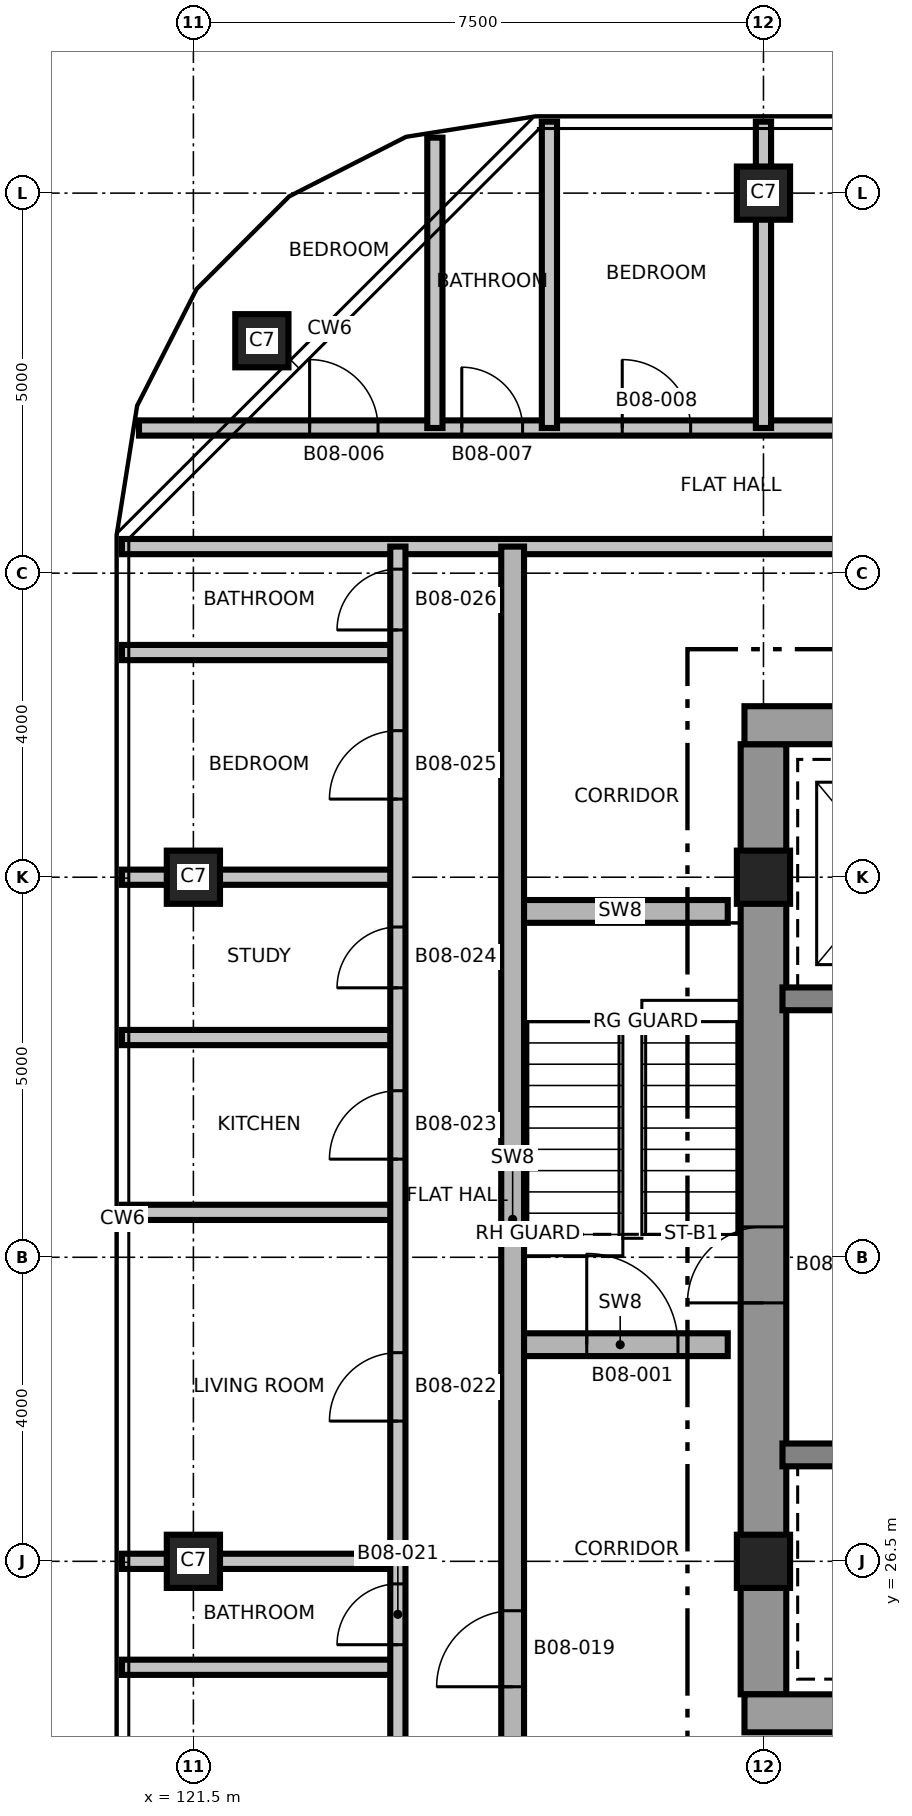
"""IFC4 building model, lengths in metres.
Left out: names, types, materials, properties, quantities, classifications, styles, units other than length and angle.
Written with IfcOpenShell. Run it as: python <this file> out.ifc"""

import sys

from ifc_helpers import new_model, si_unit, direction, frame, frame_2d, origin, origin_2d, place, context, subcontext, project, spatial, rectangle, extrude, element, fill, save


model = new_model("IFC4")
c1 = context("Model", 3, precision=1e-05, world=origin(), true_north=direction((0.0, 1.0)))
c2 = subcontext(c1, "Body", "Model", "MODEL_VIEW")
j1 = project(units=[si_unit("LENGTHUNIT", "METRE"), si_unit("PLANEANGLEUNIT", "RADIAN")], contexts=[c1])
p1 = place(None, origin())
s1 = spatial("IfcSite", under=j1, at=p1, CompositionType="ELEMENT")
p2 = place(p1, origin())
s2 = spatial("IfcBuilding", under=s1, at=p2, CompositionType="ELEMENT")
p3 = place(p2, frame((0.0, 0.0, 94.5)))
s3 = spatial("IfcBuildingStorey", under=s2, at=p3, CompositionType="ELEMENT", Elevation=94.5)
p4 = place(p3, frame((129.0, 24.75, 0.0), z_axis=(0.0, 0.0, 1.0), x_axis=(0.0, 1.0, 0.0)))
e1 = element("IfcWall", 1, at=p4, inside=s3, PredefinedType="SHEAR", context=c2, shape_type="SweptSolid", body=[
    extrude(rectangle(XDim=12.5, YDim=0.6, at=frame_2d((6.25, 0.0))), origin(), (0.0, 0.0, 1.0), 3.7),
])
p5 = place(p4, frame((5.15, 0.0, 0.0)))
e2 = element("IfcOpeningElement", 2, at=p5, cuts=e1, PredefinedType="OPENING", context=c2, shape_type="SweptSolid", body=[
    extrude(rectangle(XDim=1.0, YDim=2.1, at=frame_2d((0.5, 1.05))), frame((0.0, 0.31, 0.0), z_axis=(0.0, -1.0, 0.0), x_axis=(1.0, 0.0, 0.0)), (0.0, 0.0, 1.0), 0.62),
])
p6 = place(p3, frame((128.75, 24.5, 0.0), z_axis=(0.0, 0.0, 1.0), x_axis=(1.0, 0.0, 0.0)))
e3 = element("IfcWall", 3, at=p6, inside=s3, PredefinedType="SHEAR", context=c2, shape_type="SweptSolid", body=[
    extrude(rectangle(XDim=15.0, YDim=0.5, at=frame_2d((7.5, 0.0))), origin(), (0.0, 0.0, 1.0), 3.7),
])
p7 = place(p6, frame((9.65, 0.0, 0.0)))
e4 = element("IfcOpeningElement", 4, at=p7, cuts=e3, PredefinedType="OPENING", context=c2, shape_type="SweptSolid", body=[
    extrude(rectangle(XDim=1.5, YDim=2.1, at=frame_2d((0.75, 1.05))), frame((0.0, 0.26, 0.0), z_axis=(0.0, -1.0, 0.0), x_axis=(1.0, 0.0, 0.0)), (0.0, 0.0, 1.0), 0.52),
])
p8 = place(p6, frame((1.25, 0.0, 0.0)))
e5 = element("IfcOpeningElement", 5, at=p8, cuts=e3, PredefinedType="OPENING", context=c2, shape_type="SweptSolid", body=[
    extrude(rectangle(XDim=0.9, YDim=2.1, at=frame_2d((0.45, 1.05))), frame((0.0, 0.26, 0.0), z_axis=(0.0, -1.0, 0.0), x_axis=(1.0, 0.0, 0.0)), (0.0, 0.0, 1.0), 0.52),
])
p9 = place(p3, frame((128.75, 37.5, 0.0), z_axis=(0.0, 0.0, 1.0), x_axis=(1.0, 0.0, 0.0)))
e6 = element("IfcWall", 6, at=p9, inside=s3, PredefinedType="SHEAR", context=c2, shape_type="SweptSolid", body=[
    extrude(rectangle(XDim=15.0, YDim=0.5, at=frame_2d((7.5, 0.0))), origin(), (0.0, 0.0, 1.0), 3.7),
])
p10 = place(p9, frame((9.65, 0.0, 0.0)))
e7 = element("IfcOpeningElement", 7, at=p10, cuts=e6, PredefinedType="OPENING", context=c2, shape_type="SweptSolid", body=[
    extrude(rectangle(XDim=1.5, YDim=2.1, at=frame_2d((0.75, 1.05))), frame((0.0, 0.26, 0.0), z_axis=(0.0, -1.0, 0.0), x_axis=(1.0, 0.0, 0.0)), (0.0, 0.0, 1.0), 0.52),
])
p11 = place(p9, frame((12.85, 0.0, 0.0)))
e8 = element("IfcOpeningElement", 8, at=p11, cuts=e6, PredefinedType="OPENING", context=c2, shape_type="SweptSolid", body=[
    extrude(rectangle(XDim=0.9, YDim=2.1, at=frame_2d((0.45, 1.05))), frame((0.0, 0.26, 0.0), z_axis=(0.0, -1.0, 0.0), x_axis=(1.0, 0.0, 0.0)), (0.0, 0.0, 1.0), 0.52),
])
p12 = place(p9, frame((3.65, 0.0, 0.0)))
e9 = element("IfcOpeningElement", 9, at=p12, cuts=e6, PredefinedType="OPENING", context=c2, shape_type="SweptSolid", body=[
    extrude(rectangle(XDim=0.9, YDim=2.1, at=frame_2d((0.45, 1.05))), frame((0.0, 0.26, 0.0), z_axis=(0.0, -1.0, 0.0), x_axis=(1.0, 0.0, 0.0)), (0.0, 0.0, 1.0), 0.52),
])
p13 = place(p9, frame((5.55, 0.0, 0.0)))
e10 = element("IfcOpeningElement", 10, at=p13, cuts=e6, PredefinedType="OPENING", context=c2, shape_type="SweptSolid", body=[
    extrude(rectangle(XDim=0.9, YDim=2.1, at=frame_2d((0.45, 1.05))), frame((0.0, 0.26, 0.0), z_axis=(0.0, -1.0, 0.0), x_axis=(1.0, 0.0, 0.0)), (0.0, 0.0, 1.0), 0.52),
])
p14 = place(p9, frame((7.45, 0.0, 0.0)))
e11 = element("IfcOpeningElement", 11, at=p14, cuts=e6, PredefinedType="OPENING", context=c2, shape_type="SweptSolid", body=[
    extrude(rectangle(XDim=0.9, YDim=2.1, at=frame_2d((0.45, 1.05))), frame((0.0, 0.26, 0.0), z_axis=(0.0, -1.0, 0.0), x_axis=(1.0, 0.0, 0.0)), (0.0, 0.0, 1.0), 0.52),
])
p15 = place(p3, frame((129.25, 27.9, 0.0), z_axis=(0.0, 0.0, 1.0), x_axis=(1.0, 0.0, 0.0)))
e12 = element("IfcWall", 12, at=p15, inside=s3, PredefinedType="SHEAR", context=c2, shape_type="SweptSolid", body=[
    extrude(rectangle(XDim=2.7, YDim=0.3, at=frame_2d((1.35, 0.0))), origin(), (0.0, 0.0, 1.0), 3.7),
])
p16 = place(p3, frame((129.25, 33.9, 0.0), z_axis=(0.0, 0.0, 1.0), x_axis=(1.0, 0.0, 0.0)))
e13 = element("IfcWall", 13, at=p16, inside=s3, PredefinedType="SHEAR", context=c2, shape_type="SweptSolid", body=[
    extrude(rectangle(XDim=2.7, YDim=0.3, at=frame_2d((1.35, 0.0))), origin(), (0.0, 0.0, 1.0), 3.7),
])
p17 = place(p16, frame((1.05, 0.0, 0.0)))
e14 = element("IfcOpeningElement", 14, at=p17, cuts=e13, PredefinedType="OPENING", context=c2, shape_type="SweptSolid", body=[
    extrude(rectangle(XDim=1.3, YDim=2.4, at=frame_2d((0.65, 1.2))), frame((0.0, 0.16, 0.0), z_axis=(0.0, -1.0, 0.0), x_axis=(1.0, 0.0, 0.0)), (0.0, 0.0, 1.0), 0.32),
])
for number, where, z_axis, x_axis in (
    (15, (121.5, 26.5, 0.0), (0.0, 0.0, 1.0), (1.0, 0.0, 0.0)),
    (16, (129.0, 26.5, 0.0), (0.0, 0.0, 1.0), (1.0, 0.0, 0.0)),
    (17, (121.5, 35.5, 0.0), (0.0, 0.0, 1.0), (1.0, 0.0, 0.0)),
    (18, (129.0, 35.5, 0.0), (0.0, 0.0, 1.0), (1.0, 0.0, 0.0)),
    (19, (122.401, 42.558, 0.0), (0.0, 0.0, 1.0), (1.0, 0.0, 0.0)),
    (20, (129.0, 44.5, 0.0), (0.0, 0.0, 1.0), (1.0, 0.0, 0.0)),
):
    element("IfcColumn", number, at=place(p3, frame(where, z_axis=z_axis, x_axis=x_axis)), inside=s3, PredefinedType="COLUMN", context=c2, shape_type="SweptSolid", body=[
        extrude(rectangle(XDim=0.7, YDim=0.7, at=origin_2d()), origin(), (0.0, 0.0, 1.0), 3.7),
    ])
for number, where, z_axis, x_axis in (
    (21, (120.56, 25.106, 0.0), (0.0, 0.0, 1.0), (1.0, 0.0, 0.0)),
    (22, (120.56, 26.5, 0.0), (0.0, 0.0, 1.0), (1.0, 0.0, 0.0)),
):
    element("IfcWall", number, at=place(p3, frame(where, z_axis=z_axis, x_axis=x_axis)), inside=s3, PredefinedType="PARTITIONING", context=c2, shape_type="SweptSolid", body=[
        extrude(rectangle(XDim=3.63, YDim=0.2, at=frame_2d((1.815, 0.0))), origin(), (0.0, 0.0, 1.0), 3.4),
    ])
p18 = place(p3, frame((125.7, 29.35, 0.0), z_axis=(0.0, 0.0, 1.0), x_axis=(1.0, 0.0, 0.0)))
e23 = element("IfcWall", 23, at=p18, inside=s3, PredefinedType="SHEAR", context=c2, shape_type="SweptSolid", body=[
    extrude(rectangle(XDim=2.83, YDim=0.3, at=frame_2d((1.415, 0.0))), origin(), (0.0, 0.0, 1.0), 3.4),
])
p19 = place(p18, frame((0.975, 0.0, 0.0)))
e24 = element("IfcOpeningElement", 24, at=p19, cuts=e23, PredefinedType="OPENING", context=c2, shape_type="SweptSolid", body=[
    extrude(rectangle(XDim=1.2, YDim=2.1, at=frame_2d((0.6, 1.05))), frame((0.0, 0.16, 0.0), z_axis=(0.0, -1.0, 0.0), x_axis=(1.0, 0.0, 0.0)), (0.0, 0.0, 1.0), 0.32),
])
for number, where, z_axis, x_axis in (
    (25, (120.56, 31.091, 0.0), (0.0, 0.0, 1.0), (1.0, 0.0, 0.0)),
    (26, (120.56, 33.391, 0.0), (0.0, 0.0, 1.0), (1.0, 0.0, 0.0)),
):
    element("IfcWall", number, at=place(p3, frame(where, z_axis=z_axis, x_axis=x_axis)), inside=s3, PredefinedType="PARTITIONING", context=c2, shape_type="SweptSolid", body=[
        extrude(rectangle(XDim=3.63, YDim=0.2, at=frame_2d((1.815, 0.0))), origin(), (0.0, 0.0, 1.0), 3.4),
    ])
p20 = place(p3, frame((125.7, 35.05, 0.0), z_axis=(0.0, 0.0, 1.0), x_axis=(1.0, 0.0, 0.0)))
e27 = element("IfcWall", 27, at=p20, inside=s3, PredefinedType="SHEAR", context=c2, shape_type="SweptSolid", body=[
    extrude(rectangle(XDim=2.83, YDim=0.3, at=frame_2d((1.415, 0.0))), origin(), (0.0, 0.0, 1.0), 3.4),
])
for number, where, z_axis, x_axis in (
    (28, (120.56, 35.5, 0.0), (0.0, 0.0, 1.0), (1.0, 0.0, 0.0)),
    (29, (120.56, 38.456, 0.0), (0.0, 0.0, 1.0), (1.0, 0.0, 0.0)),
):
    element("IfcWall", number, at=place(p3, frame(where, z_axis=z_axis, x_axis=x_axis)), inside=s3, PredefinedType="PARTITIONING", context=c2, shape_type="SweptSolid", body=[
        extrude(rectangle(XDim=3.63, YDim=0.2, at=frame_2d((1.815, 0.0))), origin(), (0.0, 0.0, 1.0), 3.4),
    ])
p21 = place(p3, frame((120.56, 39.85, 0.0), z_axis=(0.0, 0.0, 1.0), x_axis=(1.0, 0.0, 0.0)))
e30 = element("IfcWall", 30, at=p21, inside=s3, PredefinedType="PARTITIONING", context=c2, shape_type="SweptSolid", body=[
    extrude(rectangle(XDim=24.38, YDim=0.2, at=frame_2d((12.19, 0.0))), origin(), (0.0, 0.0, 1.0), 3.4),
])
p22 = place(p21, frame((10.54, 0.0, 0.0)))
e31 = element("IfcOpeningElement", 31, at=p22, cuts=e30, PredefinedType="OPENING", context=c2, shape_type="SweptSolid", body=[
    extrude(rectangle(XDim=1.0, YDim=2.1, at=frame_2d((0.5, 1.05))), frame((0.0, 0.11, 0.0), z_axis=(0.0, -1.0, 0.0), x_axis=(1.0, 0.0, 0.0)), (0.0, 0.0, 1.0), 0.22),
])
p23 = place(p21, frame((16.09, 0.0, 0.0)))
e32 = element("IfcOpeningElement", 32, at=p23, cuts=e30, PredefinedType="OPENING", context=c2, shape_type="SweptSolid", body=[
    extrude(rectangle(XDim=1.8, YDim=2.1, at=frame_2d((0.9, 1.05))), frame((0.0, 0.11, 0.0), z_axis=(0.0, -1.0, 0.0), x_axis=(1.0, 0.0, 0.0)), (0.0, 0.0, 1.0), 0.22),
])
p24 = place(p3, frame((120.784, 41.41, 0.0), z_axis=(0.0, 0.0, 1.0), x_axis=(1.0, 0.0, 0.0)))
e33 = element("IfcWall", 33, at=p24, inside=s3, PredefinedType="PARTITIONING", context=c2, shape_type="SweptSolid", body=[
    extrude(rectangle(XDim=15.716, YDim=0.2, at=frame_2d((7.858, 0.0))), origin(), (0.0, 0.0, 1.0), 3.4),
])
p25 = place(p24, frame((2.245, 0.0, 0.0)))
e34 = element("IfcOpeningElement", 34, at=p25, cuts=e33, PredefinedType="OPENING", context=c2, shape_type="SweptSolid", body=[
    extrude(rectangle(XDim=0.9, YDim=2.1, at=frame_2d((0.45, 1.05))), frame((0.0, 0.11, 0.0), z_axis=(0.0, -1.0, 0.0), x_axis=(1.0, 0.0, 0.0)), (0.0, 0.0, 1.0), 0.22),
])
p26 = place(p24, frame((4.247, 0.0, 0.0)))
e35 = element("IfcOpeningElement", 35, at=p26, cuts=e33, PredefinedType="OPENING", context=c2, shape_type="SweptSolid", body=[
    extrude(rectangle(XDim=0.8, YDim=2.1, at=frame_2d((0.4, 1.05))), frame((0.0, 0.11, 0.0), z_axis=(0.0, -1.0, 0.0), x_axis=(1.0, 0.0, 0.0)), (0.0, 0.0, 1.0), 0.22),
])
p27 = place(p24, frame((6.358, 0.0, 0.0)))
e36 = element("IfcOpeningElement", 36, at=p27, cuts=e33, PredefinedType="OPENING", context=c2, shape_type="SweptSolid", body=[
    extrude(rectangle(XDim=0.9, YDim=2.1, at=frame_2d((0.45, 1.05))), frame((0.0, 0.11, 0.0), z_axis=(0.0, -1.0, 0.0), x_axis=(1.0, 0.0, 0.0)), (0.0, 0.0, 1.0), 0.22),
])
p28 = place(p24, frame((10.233, 0.0, 0.0)))
e37 = element("IfcOpeningElement", 37, at=p28, cuts=e33, PredefinedType="OPENING", context=c2, shape_type="SweptSolid", body=[
    extrude(rectangle(XDim=0.9, YDim=2.1, at=frame_2d((0.45, 1.05))), frame((0.0, 0.11, 0.0), z_axis=(0.0, -1.0, 0.0), x_axis=(1.0, 0.0, 0.0)), (0.0, 0.0, 1.0), 0.22),
])
p29 = place(p24, frame((13.983, 0.0, 0.0)))
e38 = element("IfcOpeningElement", 38, at=p29, cuts=e33, PredefinedType="OPENING", context=c2, shape_type="SweptSolid", body=[
    extrude(rectangle(XDim=0.9, YDim=2.1, at=frame_2d((0.45, 1.05))), frame((0.0, 0.11, 0.0), z_axis=(0.0, -1.0, 0.0), x_axis=(1.0, 0.0, 0.0)), (0.0, 0.0, 1.0), 0.22),
])
p30 = place(p3, frame((124.19, 22.15, 0.0), z_axis=(0.0, 0.0, 1.0), x_axis=(0.0, 1.0, 0.0)))
e39 = element("IfcWall", 39, at=p30, inside=s3, PredefinedType="PARTITIONING", context=c2, shape_type="SweptSolid", body=[
    extrude(rectangle(XDim=17.7, YDim=0.2, at=frame_2d((8.85, 0.0))), origin(), (0.0, 0.0, 1.0), 3.4),
])
p31 = place(p30, frame((1.028, 0.0, 0.0)))
e40 = element("IfcOpeningElement", 40, at=p31, cuts=e39, PredefinedType="OPENING", context=c2, shape_type="SweptSolid", body=[
    extrude(rectangle(XDim=0.9, YDim=2.1, at=frame_2d((0.45, 1.05))), frame((0.0, 0.11, 0.0), z_axis=(0.0, -1.0, 0.0), x_axis=(1.0, 0.0, 0.0)), (0.0, 0.0, 1.0), 0.22),
])
p32 = place(p30, frame((3.253, 0.0, 0.0)))
e41 = element("IfcOpeningElement", 41, at=p32, cuts=e39, PredefinedType="OPENING", context=c2, shape_type="SweptSolid", body=[
    extrude(rectangle(XDim=0.8, YDim=2.1, at=frame_2d((0.4, 1.05))), frame((0.0, 0.11, 0.0), z_axis=(0.0, -1.0, 0.0), x_axis=(1.0, 0.0, 0.0)), (0.0, 0.0, 1.0), 0.22),
])
p33 = place(p30, frame((6.195, 0.0, 0.0)))
e42 = element("IfcOpeningElement", 42, at=p33, cuts=e39, PredefinedType="OPENING", context=c2, shape_type="SweptSolid", body=[
    extrude(rectangle(XDim=0.9, YDim=2.1, at=frame_2d((0.45, 1.05))), frame((0.0, 0.11, 0.0), z_axis=(0.0, -1.0, 0.0), x_axis=(1.0, 0.0, 0.0)), (0.0, 0.0, 1.0), 0.22),
])
p34 = place(p30, frame((9.641, 0.0, 0.0)))
e43 = element("IfcOpeningElement", 43, at=p34, cuts=e39, PredefinedType="OPENING", context=c2, shape_type="SweptSolid", body=[
    extrude(rectangle(XDim=0.9, YDim=2.1, at=frame_2d((0.45, 1.05))), frame((0.0, 0.11, 0.0), z_axis=(0.0, -1.0, 0.0), x_axis=(1.0, 0.0, 0.0)), (0.0, 0.0, 1.0), 0.22),
])
p35 = place(p30, frame((11.895, 0.0, 0.0)))
e44 = element("IfcOpeningElement", 44, at=p35, cuts=e39, PredefinedType="OPENING", context=c2, shape_type="SweptSolid", body=[
    extrude(rectangle(XDim=0.8, YDim=2.1, at=frame_2d((0.4, 1.05))), frame((0.0, 0.11, 0.0), z_axis=(0.0, -1.0, 0.0), x_axis=(1.0, 0.0, 0.0)), (0.0, 0.0, 1.0), 0.22),
])
p36 = place(p30, frame((14.378, 0.0, 0.0)))
e45 = element("IfcOpeningElement", 45, at=p36, cuts=e39, PredefinedType="OPENING", context=c2, shape_type="SweptSolid", body=[
    extrude(rectangle(XDim=0.9, YDim=2.1, at=frame_2d((0.45, 1.05))), frame((0.0, 0.11, 0.0), z_axis=(0.0, -1.0, 0.0), x_axis=(1.0, 0.0, 0.0)), (0.0, 0.0, 1.0), 0.22),
])
p37 = place(p30, frame((16.603, 0.0, 0.0)))
e46 = element("IfcOpeningElement", 46, at=p37, cuts=e39, PredefinedType="OPENING", context=c2, shape_type="SweptSolid", body=[
    extrude(rectangle(XDim=0.8, YDim=2.1, at=frame_2d((0.4, 1.05))), frame((0.0, 0.11, 0.0), z_axis=(0.0, -1.0, 0.0), x_axis=(1.0, 0.0, 0.0)), (0.0, 0.0, 1.0), 0.22),
])
p38 = place(p3, frame((124.677, 41.41, 0.0), z_axis=(0.0, 0.0, 1.0), x_axis=(0.0, 1.0, 0.0)))
e47 = element("IfcWall", 47, at=p38, inside=s3, PredefinedType="PARTITIONING", context=c2, shape_type="SweptSolid", body=[
    extrude(rectangle(XDim=3.82, YDim=0.2, at=frame_2d((1.91, 0.0))), origin(), (0.0, 0.0, 1.0), 3.4),
])
p39 = place(p3, frame((125.7, 22.15, 0.0), z_axis=(0.0, 0.0, 1.0), x_axis=(0.0, 1.0, 0.0)))
e48 = element("IfcWall", 48, at=p39, inside=s3, PredefinedType="SHEAR", context=c2, shape_type="SweptSolid", body=[
    extrude(rectangle(XDim=17.7, YDim=0.3, at=frame_2d((8.85, 0.0))), origin(), (0.0, 0.0, 1.0), 3.4),
])
p40 = place(p39, frame((2.7, 0.0, 0.0)))
e49 = element("IfcOpeningElement", 49, at=p40, cuts=e48, PredefinedType="OPENING", context=c2, shape_type="SweptSolid", body=[
    extrude(rectangle(XDim=1.0, YDim=2.1, at=frame_2d((0.5, 1.05))), frame((0.0, 0.16, 0.0), z_axis=(0.0, -1.0, 0.0), x_axis=(1.0, 0.0, 0.0)), (0.0, 0.0, 1.0), 0.32),
])
for number, where, z_axis, x_axis in (
    (50, (126.184, 41.41, 0.0), (0.0, 0.0, 1.0), (0.0, 1.0, 0.0)),
    (51, (129.0, 41.41, 0.0), (0.0, 0.0, 1.0), (0.0, 1.0, 0.0)),
):
    element("IfcWall", number, at=place(p3, frame(where, z_axis=z_axis, x_axis=x_axis)), inside=s3, PredefinedType="PARTITIONING", context=c2, shape_type="SweptSolid", body=[
        extrude(rectangle(XDim=4.03, YDim=0.2, at=frame_2d((2.015, 0.0))), origin(), (0.0, 0.0, 1.0), 3.4),
    ])
p41 = place(p19, origin())
e52 = element("IfcDoor", 52, at=p41, inside=s3, OperationType="SINGLE_SWING_LEFT", PredefinedType="DOOR", context=c2, shape_type="SweptSolid", body=[
    extrude(rectangle(XDim=1.2, YDim=2.1, at=frame_2d((0.6, 1.05))), frame((0.0, 0.025, 0.0), z_axis=(0.0, -1.0, 0.0), x_axis=(1.0, 0.0, 0.0)), (0.0, 0.0, 1.0), 0.05),
])
fill(e24, e52)
p42 = place(p25, origin())
e53 = element("IfcDoor", 53, at=p42, inside=s3, OperationType="SINGLE_SWING_RIGHT", PredefinedType="DOOR", context=c2, shape_type="SweptSolid", body=[
    extrude(rectangle(XDim=0.9, YDim=2.1, at=frame_2d((0.45, 1.05))), frame((0.0, 0.025, 0.0), z_axis=(0.0, -1.0, 0.0), x_axis=(1.0, 0.0, 0.0)), (0.0, 0.0, 1.0), 0.05),
])
fill(e34, e53)
p43 = place(p26, origin())
e54 = element("IfcDoor", 54, at=p43, inside=s3, OperationType="SINGLE_SWING_LEFT", PredefinedType="DOOR", context=c2, shape_type="SweptSolid", body=[
    extrude(rectangle(XDim=0.8, YDim=2.1, at=frame_2d((0.4, 1.05))), frame((0.0, 0.025, 0.0), z_axis=(0.0, -1.0, 0.0), x_axis=(1.0, 0.0, 0.0)), (0.0, 0.0, 1.0), 0.05),
])
fill(e35, e54)
p44 = place(p27, origin())
e55 = element("IfcDoor", 55, at=p44, inside=s3, OperationType="SINGLE_SWING_RIGHT", PredefinedType="DOOR", context=c2, shape_type="SweptSolid", body=[
    extrude(rectangle(XDim=0.9, YDim=2.1, at=frame_2d((0.45, 1.05))), frame((0.0, 0.025, 0.0), z_axis=(0.0, -1.0, 0.0), x_axis=(1.0, 0.0, 0.0)), (0.0, 0.0, 1.0), 0.05),
])
fill(e36, e55)
p45 = place(p40, origin())
e56 = element("IfcDoor", 56, at=p45, inside=s3, OperationType="SINGLE_SWING_LEFT", PredefinedType="DOOR", context=c2, shape_type="SweptSolid", body=[
    extrude(rectangle(XDim=1.0, YDim=2.1, at=frame_2d((0.5, 1.05))), frame((0.0, 0.025, 0.0), z_axis=(0.0, -1.0, 0.0), x_axis=(1.0, 0.0, 0.0)), (0.0, 0.0, 1.0), 0.05),
])
fill(e49, e56)
p46 = place(p32, origin())
e57 = element("IfcDoor", 57, at=p46, inside=s3, OperationType="SINGLE_SWING_LEFT", PredefinedType="DOOR", context=c2, shape_type="SweptSolid", body=[
    extrude(rectangle(XDim=0.8, YDim=2.1, at=frame_2d((0.4, 1.05))), frame((0.0, 0.025, 0.0), z_axis=(0.0, -1.0, 0.0), x_axis=(1.0, 0.0, 0.0)), (0.0, 0.0, 1.0), 0.05),
])
fill(e41, e57)
p47 = place(p33, origin())
e58 = element("IfcDoor", 58, at=p47, inside=s3, OperationType="SINGLE_SWING_RIGHT", PredefinedType="DOOR", context=c2, shape_type="SweptSolid", body=[
    extrude(rectangle(XDim=0.9, YDim=2.1, at=frame_2d((0.45, 1.05))), frame((0.0, 0.025, 0.0), z_axis=(0.0, -1.0, 0.0), x_axis=(1.0, 0.0, 0.0)), (0.0, 0.0, 1.0), 0.05),
])
fill(e42, e58)
p48 = place(p34, origin())
e59 = element("IfcDoor", 59, at=p48, inside=s3, OperationType="SINGLE_SWING_LEFT", PredefinedType="DOOR", context=c2, shape_type="SweptSolid", body=[
    extrude(rectangle(XDim=0.9, YDim=2.1, at=frame_2d((0.45, 1.05))), frame((0.0, 0.025, 0.0), z_axis=(0.0, -1.0, 0.0), x_axis=(1.0, 0.0, 0.0)), (0.0, 0.0, 1.0), 0.05),
])
fill(e43, e59)
p49 = place(p35, origin())
e60 = element("IfcDoor", 60, at=p49, inside=s3, OperationType="SINGLE_SWING_RIGHT", PredefinedType="DOOR", context=c2, shape_type="SweptSolid", body=[
    extrude(rectangle(XDim=0.8, YDim=2.1, at=frame_2d((0.4, 1.05))), frame((0.0, 0.025, 0.0), z_axis=(0.0, -1.0, 0.0), x_axis=(1.0, 0.0, 0.0)), (0.0, 0.0, 1.0), 0.05),
])
fill(e44, e60)
p50 = place(p36, origin())
e61 = element("IfcDoor", 61, at=p50, inside=s3, OperationType="SINGLE_SWING_LEFT", PredefinedType="DOOR", context=c2, shape_type="SweptSolid", body=[
    extrude(rectangle(XDim=0.9, YDim=2.1, at=frame_2d((0.45, 1.05))), frame((0.0, 0.025, 0.0), z_axis=(0.0, -1.0, 0.0), x_axis=(1.0, 0.0, 0.0)), (0.0, 0.0, 1.0), 0.05),
])
fill(e45, e61)
p51 = place(p37, origin())
e62 = element("IfcDoor", 62, at=p51, inside=s3, OperationType="SINGLE_SWING_RIGHT", PredefinedType="DOOR", context=c2, shape_type="SweptSolid", body=[
    extrude(rectangle(XDim=0.8, YDim=2.1, at=frame_2d((0.4, 1.05))), frame((0.0, 0.025, 0.0), z_axis=(0.0, -1.0, 0.0), x_axis=(1.0, 0.0, 0.0)), (0.0, 0.0, 1.0), 0.05),
])
fill(e46, e62)
p52 = place(p5, origin())
e63 = element("IfcDoor", 63, at=p52, inside=s3, OperationType="SINGLE_SWING_RIGHT", PredefinedType="DOOR", context=c2, shape_type="SweptSolid", body=[
    extrude(rectangle(XDim=1.0, YDim=2.1, at=frame_2d((0.5, 1.05))), frame((0.0, 0.025, 0.0), z_axis=(0.0, -1.0, 0.0), x_axis=(1.0, 0.0, 0.0)), (0.0, 0.0, 1.0), 0.05),
])
fill(e2, e63)
save(model, sys.argv[1])
